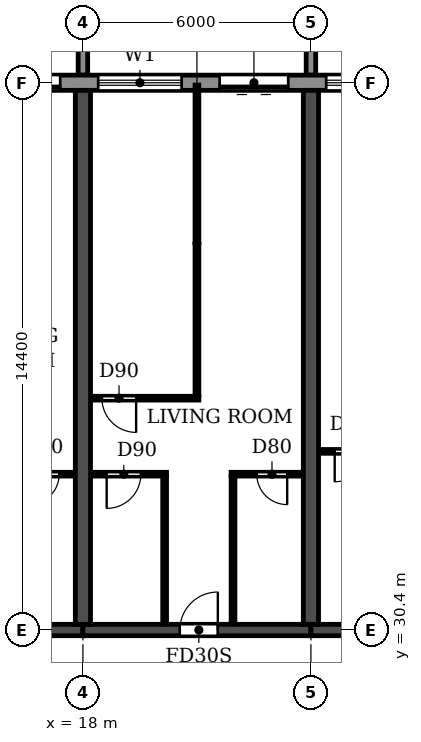
"""IFC4 building model, lengths in metres.
Left out: names, types, materials, properties, quantities, classifications, styles, units other than length and angle.
Written with IfcOpenShell. Run it as: python <this file> out.ifc"""

import sys

from ifc_helpers import new_model, si_unit, direction, frame, frame_2d, origin, place, context, subcontext, project, spatial, polyline, rectangle, outline, extrude, source, transform, mapped, element, fill, save


model = new_model("IFC4")
c1 = context("Model", 3, precision=1e-05, world=origin(), true_north=direction((0.0, 1.0)))
c2 = subcontext(c1, "Body", "Model", "MODEL_VIEW")
j1 = project(units=[si_unit("LENGTHUNIT", "METRE"), si_unit("PLANEANGLEUNIT", "RADIAN")], contexts=[c1])
p1 = place(None, origin())
s1 = spatial("IfcSite", under=j1, at=p1, CompositionType="ELEMENT")
p2 = place(p1, origin())
s2 = spatial("IfcBuilding", under=s1, at=p2, CompositionType="ELEMENT")
p3 = place(p2, frame((0.0, 0.0, 63.0)))
s3 = spatial("IfcBuildingStorey", under=s2, at=p3, CompositionType="ELEMENT", Elevation=63.0)
for number, where, z_axis, x_axis in (
    (1, (18.0, 30.55, 0.0), (0.0, 0.0, 1.0), (0.0, 1.0, 0.0)),
    (2, (24.0, 30.55, 0.0), (0.0, 0.0, 1.0), (0.0, 1.0, 0.0)),
):
    element("IfcWall", number, at=place(p3, frame(where, z_axis=z_axis, x_axis=x_axis)), inside=s3, PredefinedType="SHEAR", context=c2, shape_type="SweptSolid", body=[
        extrude(rectangle(XDim=14.05, YDim=0.4, at=frame_2d((7.025, 0.0))), origin(), (0.0, 0.0, 1.0), 2.95),
    ])
p4 = place(p3, frame((12.0, 30.4, 0.0), z_axis=(0.0, 0.0, 1.0), x_axis=(1.0, 0.0, 0.0)))
e3 = element("IfcWall", 3, at=p4, inside=s3, PredefinedType="SHEAR", context=c2, shape_type="SweptSolid", body=[
    extrude(rectangle(XDim=6.0, YDim=0.3, at=frame_2d((3.0, 0.0))), origin(), (0.0, 0.0, 1.0), 2.35),
])
p5 = place(p4, frame((2.55, 0.0, 0.0)))
e4 = element("IfcOpeningElement", 4, at=p5, cuts=e3, PredefinedType="OPENING", context=c2, shape_type="SweptSolid", body=[
    extrude(rectangle(XDim=1.0, YDim=2.1, at=frame_2d((0.5, 1.05))), frame((0.0, 0.16, 0.0), z_axis=(0.0, -1.0, 0.0), x_axis=(1.0, 0.0, 0.0)), (0.0, 0.0, 1.0), 0.32),
])
p6 = place(p3, frame((18.0, 30.4, 0.0), z_axis=(0.0, 0.0, 1.0), x_axis=(1.0, 0.0, 0.0)))
e5 = element("IfcWall", 5, at=p6, inside=s3, PredefinedType="SHEAR", context=c2, shape_type="SweptSolid", body=[
    extrude(rectangle(XDim=6.0, YDim=0.3, at=frame_2d((3.0, 0.0))), origin(), (0.0, 0.0, 1.0), 2.35),
])
p7 = place(p6, frame((2.55, 0.0, 0.0)))
e6 = element("IfcOpeningElement", 6, at=p7, cuts=e5, PredefinedType="OPENING", context=c2, shape_type="SweptSolid", body=[
    extrude(rectangle(XDim=1.0, YDim=2.1, at=frame_2d((0.5, 1.05))), frame((0.0, 0.16, 0.0), z_axis=(0.0, -1.0, 0.0), x_axis=(1.0, 0.0, 0.0)), (0.0, 0.0, 1.0), 0.32),
])
p8 = place(p3, frame((24.0, 30.4, 0.0), z_axis=(0.0, 0.0, 1.0), x_axis=(1.0, 0.0, 0.0)))
e7 = element("IfcWall", 7, at=p8, inside=s3, PredefinedType="SHEAR", context=c2, shape_type="SweptSolid", body=[
    extrude(rectangle(XDim=6.0, YDim=0.3, at=frame_2d((3.0, 0.0))), origin(), (0.0, 0.0, 1.0), 2.35),
])
p9 = place(p8, frame((2.45, 0.0, 0.0)))
e8 = element("IfcOpeningElement", 8, at=p9, cuts=e7, PredefinedType="OPENING", context=c2, shape_type="SweptSolid", body=[
    extrude(rectangle(XDim=1.0, YDim=2.1, at=frame_2d((0.5, 1.05))), frame((0.0, 0.16, 0.0), z_axis=(0.0, -1.0, 0.0), x_axis=(1.0, 0.0, 0.0)), (0.0, 0.0, 1.0), 0.32),
])
p10 = place(p3, frame((91.317, 44.8, 0.0), z_axis=(0.0, 0.0, 1.0), x_axis=(-1.0, 0.0, 0.0)))
e9 = element("IfcWall", 9, at=p10, inside=s3, PredefinedType="STANDARD", context=c2, shape_type="SweptSolid", body=[
    extrude(rectangle(XDim=80.634, YDim=0.4, at=frame_2d((40.317, 0.0))), origin(), (0.0, 0.0, 1.0), 2.95),
])
p11 = place(p10, frame((76.717, 0.0, 0.9)))
e10 = element("IfcOpeningElement", 10, at=p11, cuts=e9, PredefinedType="OPENING", context=c2, shape_type="SweptSolid", body=[
    extrude(rectangle(XDim=2.2, YDim=1.5, at=frame_2d((1.1, 0.75))), frame((0.0, 0.21, 0.0), z_axis=(0.0, -1.0, 0.0), x_axis=(1.0, 0.0, 0.0)), (0.0, 0.0, 1.0), 0.42),
])
p12 = place(p10, frame((73.917, 0.0, 0.0)))
e11 = element("IfcOpeningElement", 11, at=p12, cuts=e9, PredefinedType="OPENING", context=c2, shape_type="SweptSolid", body=[
    extrude(rectangle(XDim=1.8, YDim=2.4, at=frame_2d((0.9, 1.2))), frame((0.0, 0.21, 0.0), z_axis=(0.0, -1.0, 0.0), x_axis=(1.0, 0.0, 0.0)), (0.0, 0.0, 1.0), 0.42),
])
p13 = place(p10, frame((70.717, 0.0, 0.9)))
e12 = element("IfcOpeningElement", 12, at=p13, cuts=e9, PredefinedType="OPENING", context=c2, shape_type="SweptSolid", body=[
    extrude(rectangle(XDim=2.2, YDim=1.5, at=frame_2d((1.1, 0.75))), frame((0.0, 0.21, 0.0), z_axis=(0.0, -1.0, 0.0), x_axis=(1.0, 0.0, 0.0)), (0.0, 0.0, 1.0), 0.42),
])
p14 = place(p10, frame((67.917, 0.0, 0.0)))
e13 = element("IfcOpeningElement", 13, at=p14, cuts=e9, PredefinedType="OPENING", context=c2, shape_type="SweptSolid", body=[
    extrude(rectangle(XDim=1.8, YDim=2.4, at=frame_2d((0.9, 1.2))), frame((0.0, 0.21, 0.0), z_axis=(0.0, -1.0, 0.0), x_axis=(1.0, 0.0, 0.0)), (0.0, 0.0, 1.0), 0.42),
])
p15 = place(p10, frame((64.717, 0.0, 0.9)))
e14 = element("IfcOpeningElement", 14, at=p15, cuts=e9, PredefinedType="OPENING", context=c2, shape_type="SweptSolid", body=[
    extrude(rectangle(XDim=2.2, YDim=1.5, at=frame_2d((1.1, 0.75))), frame((0.0, 0.21, 0.0), z_axis=(0.0, -1.0, 0.0), x_axis=(1.0, 0.0, 0.0)), (0.0, 0.0, 1.0), 0.42),
])
p16 = place(p10, frame((61.917, 0.0, 0.0)))
e15 = element("IfcOpeningElement", 15, at=p16, cuts=e9, PredefinedType="OPENING", context=c2, shape_type="SweptSolid", body=[
    extrude(rectangle(XDim=1.8, YDim=2.4, at=frame_2d((0.9, 1.2))), frame((0.0, 0.21, 0.0), z_axis=(0.0, -1.0, 0.0), x_axis=(1.0, 0.0, 0.0)), (0.0, 0.0, 1.0), 0.42),
])
p17 = place(p10, frame((58.717, 0.0, 0.9)))
e16 = element("IfcOpeningElement", 16, at=p17, cuts=e9, PredefinedType="OPENING", context=c2, shape_type="SweptSolid", body=[
    extrude(rectangle(XDim=2.2, YDim=1.5, at=frame_2d((1.1, 0.75))), frame((0.0, 0.21, 0.0), z_axis=(0.0, -1.0, 0.0), x_axis=(1.0, 0.0, 0.0)), (0.0, 0.0, 1.0), 0.42),
])
p18 = place(p10, frame((55.717, 0.0, 0.9)))
e17 = element("IfcOpeningElement", 17, at=p18, cuts=e9, PredefinedType="OPENING", context=c2, shape_type="SweptSolid", body=[
    extrude(rectangle(XDim=2.2, YDim=1.5, at=frame_2d((1.1, 0.75))), frame((0.0, 0.21, 0.0), z_axis=(0.0, -1.0, 0.0), x_axis=(1.0, 0.0, 0.0)), (0.0, 0.0, 1.0), 0.42),
])
p19 = place(p10, frame((52.917, 0.0, 0.0)))
e18 = element("IfcOpeningElement", 18, at=p19, cuts=e9, PredefinedType="OPENING", context=c2, shape_type="SweptSolid", body=[
    extrude(rectangle(XDim=1.8, YDim=2.4, at=frame_2d((0.9, 1.2))), frame((0.0, 0.21, 0.0), z_axis=(0.0, -1.0, 0.0), x_axis=(1.0, 0.0, 0.0)), (0.0, 0.0, 1.0), 0.42),
])
p20 = place(p10, frame((49.717, 0.0, 0.9)))
e19 = element("IfcOpeningElement", 19, at=p20, cuts=e9, PredefinedType="OPENING", context=c2, shape_type="SweptSolid", body=[
    extrude(rectangle(XDim=2.2, YDim=1.5, at=frame_2d((1.1, 0.75))), frame((0.0, 0.21, 0.0), z_axis=(0.0, -1.0, 0.0), x_axis=(1.0, 0.0, 0.0)), (0.0, 0.0, 1.0), 0.42),
])
p21 = place(p10, frame((46.917, 0.0, 0.0)))
e20 = element("IfcOpeningElement", 20, at=p21, cuts=e9, PredefinedType="OPENING", context=c2, shape_type="SweptSolid", body=[
    extrude(rectangle(XDim=1.8, YDim=2.4, at=frame_2d((0.9, 1.2))), frame((0.0, 0.21, 0.0), z_axis=(0.0, -1.0, 0.0), x_axis=(1.0, 0.0, 0.0)), (0.0, 0.0, 1.0), 0.42),
])
p22 = place(p10, frame((43.717, 0.0, 0.9)))
e21 = element("IfcOpeningElement", 21, at=p22, cuts=e9, PredefinedType="OPENING", context=c2, shape_type="SweptSolid", body=[
    extrude(rectangle(XDim=2.2, YDim=1.5, at=frame_2d((1.1, 0.75))), frame((0.0, 0.21, 0.0), z_axis=(0.0, -1.0, 0.0), x_axis=(1.0, 0.0, 0.0)), (0.0, 0.0, 1.0), 0.42),
])
p23 = place(p10, frame((40.717, 0.0, 0.9)))
e22 = element("IfcOpeningElement", 22, at=p23, cuts=e9, PredefinedType="OPENING", context=c2, shape_type="SweptSolid", body=[
    extrude(rectangle(XDim=2.2, YDim=1.5, at=frame_2d((1.1, 0.75))), frame((0.0, 0.21, 0.0), z_axis=(0.0, -1.0, 0.0), x_axis=(1.0, 0.0, 0.0)), (0.0, 0.0, 1.0), 0.42),
])
p24 = place(p10, frame((37.717, 0.0, 0.9)))
e23 = element("IfcOpeningElement", 23, at=p24, cuts=e9, PredefinedType="OPENING", context=c2, shape_type="SweptSolid", body=[
    extrude(rectangle(XDim=2.2, YDim=1.5, at=frame_2d((1.1, 0.75))), frame((0.0, 0.21, 0.0), z_axis=(0.0, -1.0, 0.0), x_axis=(1.0, 0.0, 0.0)), (0.0, 0.0, 1.0), 0.42),
])
p25 = place(p10, frame((34.717, 0.0, 0.9)))
e24 = element("IfcOpeningElement", 24, at=p25, cuts=e9, PredefinedType="OPENING", context=c2, shape_type="SweptSolid", body=[
    extrude(rectangle(XDim=2.2, YDim=1.5, at=frame_2d((1.1, 0.75))), frame((0.0, 0.21, 0.0), z_axis=(0.0, -1.0, 0.0), x_axis=(1.0, 0.0, 0.0)), (0.0, 0.0, 1.0), 0.42),
])
p26 = place(p10, frame((31.917, 0.0, 0.0)))
e25 = element("IfcOpeningElement", 25, at=p26, cuts=e9, PredefinedType="OPENING", context=c2, shape_type="SweptSolid", body=[
    extrude(rectangle(XDim=1.8, YDim=2.4, at=frame_2d((0.9, 1.2))), frame((0.0, 0.21, 0.0), z_axis=(0.0, -1.0, 0.0), x_axis=(1.0, 0.0, 0.0)), (0.0, 0.0, 1.0), 0.42),
])
p27 = place(p10, frame((28.917, 0.0, 0.0)))
e26 = element("IfcOpeningElement", 26, at=p27, cuts=e9, PredefinedType="OPENING", context=c2, shape_type="SweptSolid", body=[
    extrude(rectangle(XDim=1.8, YDim=2.4, at=frame_2d((0.9, 1.2))), frame((0.0, 0.21, 0.0), z_axis=(0.0, -1.0, 0.0), x_axis=(1.0, 0.0, 0.0)), (0.0, 0.0, 1.0), 0.42),
])
p28 = place(p10, frame((25.717, 0.0, 0.9)))
e27 = element("IfcOpeningElement", 27, at=p28, cuts=e9, PredefinedType="OPENING", context=c2, shape_type="SweptSolid", body=[
    extrude(rectangle(XDim=2.2, YDim=1.5, at=frame_2d((1.1, 0.75))), frame((0.0, 0.21, 0.0), z_axis=(0.0, -1.0, 0.0), x_axis=(1.0, 0.0, 0.0)), (0.0, 0.0, 1.0), 0.42),
])
p29 = place(p10, frame((22.917, 0.0, 0.0)))
e28 = element("IfcOpeningElement", 28, at=p29, cuts=e9, PredefinedType="OPENING", context=c2, shape_type="SweptSolid", body=[
    extrude(rectangle(XDim=1.8, YDim=2.4, at=frame_2d((0.9, 1.2))), frame((0.0, 0.21, 0.0), z_axis=(0.0, -1.0, 0.0), x_axis=(1.0, 0.0, 0.0)), (0.0, 0.0, 1.0), 0.42),
])
p30 = place(p10, frame((19.717, 0.0, 0.9)))
e29 = element("IfcOpeningElement", 29, at=p30, cuts=e9, PredefinedType="OPENING", context=c2, shape_type="SweptSolid", body=[
    extrude(rectangle(XDim=2.2, YDim=1.5, at=frame_2d((1.1, 0.75))), frame((0.0, 0.21, 0.0), z_axis=(0.0, -1.0, 0.0), x_axis=(1.0, 0.0, 0.0)), (0.0, 0.0, 1.0), 0.42),
])
p31 = place(p10, frame((16.917, 0.0, 0.0)))
e30 = element("IfcOpeningElement", 30, at=p31, cuts=e9, PredefinedType="OPENING", context=c2, shape_type="SweptSolid", body=[
    extrude(rectangle(XDim=1.8, YDim=2.4, at=frame_2d((0.9, 1.2))), frame((0.0, 0.21, 0.0), z_axis=(0.0, -1.0, 0.0), x_axis=(1.0, 0.0, 0.0)), (0.0, 0.0, 1.0), 0.42),
])
p32 = place(p10, frame((13.717, 0.0, 0.9)))
e31 = element("IfcOpeningElement", 31, at=p32, cuts=e9, PredefinedType="OPENING", context=c2, shape_type="SweptSolid", body=[
    extrude(rectangle(XDim=2.2, YDim=1.5, at=frame_2d((1.1, 0.75))), frame((0.0, 0.21, 0.0), z_axis=(0.0, -1.0, 0.0), x_axis=(1.0, 0.0, 0.0)), (0.0, 0.0, 1.0), 0.42),
])
p33 = place(p10, frame((10.917, 0.0, 0.0)))
e32 = element("IfcOpeningElement", 32, at=p33, cuts=e9, PredefinedType="OPENING", context=c2, shape_type="SweptSolid", body=[
    extrude(rectangle(XDim=1.8, YDim=2.4, at=frame_2d((0.9, 1.2))), frame((0.0, 0.21, 0.0), z_axis=(0.0, -1.0, 0.0), x_axis=(1.0, 0.0, 0.0)), (0.0, 0.0, 1.0), 0.42),
])
p34 = place(p10, frame((7.717, 0.0, 0.9)))
e33 = element("IfcOpeningElement", 33, at=p34, cuts=e9, PredefinedType="OPENING", context=c2, shape_type="SweptSolid", body=[
    extrude(rectangle(XDim=2.2, YDim=1.5, at=frame_2d((1.1, 0.75))), frame((0.0, 0.21, 0.0), z_axis=(0.0, -1.0, 0.0), x_axis=(1.0, 0.0, 0.0)), (0.0, 0.0, 1.0), 0.42),
])
p35 = place(p10, frame((4.717, 0.0, 0.9)))
e34 = element("IfcOpeningElement", 34, at=p35, cuts=e9, PredefinedType="OPENING", context=c2, shape_type="SweptSolid", body=[
    extrude(rectangle(XDim=2.2, YDim=1.5, at=frame_2d((1.1, 0.75))), frame((0.0, 0.21, 0.0), z_axis=(0.0, -1.0, 0.0), x_axis=(1.0, 0.0, 0.0)), (0.0, 0.0, 1.0), 0.42),
])
p36 = place(p10, frame((1.717, 0.0, 0.9)))
e35 = element("IfcOpeningElement", 35, at=p36, cuts=e9, PredefinedType="OPENING", context=c2, shape_type="SweptSolid", body=[
    extrude(rectangle(XDim=2.2, YDim=1.5, at=frame_2d((1.1, 0.75))), frame((0.0, 0.21, 0.0), z_axis=(0.0, -1.0, 0.0), x_axis=(1.0, 0.0, 0.0)), (0.0, 0.0, 1.0), 0.42),
])
m1 = source(origin(), c2, "Body", "SweptSolid", [
    extrude(outline(polyline([(0.0, 0.0), (0.25, 0.0), (0.25, 3.1), (0.0, 3.1), (0.0, 0.0)])), origin(), (0.0, 0.0, 1.0), 3.1),
])
for number, where in (
    (36, (17.875, 45.0, 0.0)),
    (37, (23.875, 45.0, 0.0)),
):
    element("IfcWall", number, at=place(p3, frame(where)), inside=s3, PredefinedType="STANDARD", context=c2, shape_type="MappedRepresentation", body=[
        mapped(m1, transform((0.0, 0.0, 0.0))),
    ])
p37 = place(p3, frame((15.9, 34.5, 0.0), z_axis=(0.0, 0.0, 1.0), x_axis=(1.0, 0.0, 0.0)))
e38 = element("IfcWall", 38, at=p37, inside=s3, PredefinedType="PARTITIONING", context=c2, shape_type="SweptSolid", body=[
    extrude(rectangle(XDim=1.89, YDim=0.1, at=frame_2d((0.945, 0.0))), origin(), (0.0, 0.0, 1.0), 2.95),
])
p38 = place(p37, frame((0.675, 0.0, 0.0)))
e39 = element("IfcOpeningElement", 39, at=p38, cuts=e38, PredefinedType="OPENING", context=c2, shape_type="SweptSolid", body=[
    extrude(rectangle(XDim=0.8, YDim=2.1, at=frame_2d((0.4, 1.05))), frame((0.0, 0.06, 0.0), z_axis=(0.0, -1.0, 0.0), x_axis=(1.0, 0.0, 0.0)), (0.0, 0.0, 1.0), 0.12),
])
p39 = place(p3, frame((18.21, 34.5, 0.0), z_axis=(0.0, 0.0, 1.0), x_axis=(1.0, 0.0, 0.0)))
e40 = element("IfcWall", 40, at=p39, inside=s3, PredefinedType="PARTITIONING", context=c2, shape_type="SweptSolid", body=[
    extrude(rectangle(XDim=1.99, YDim=0.1, at=frame_2d((0.995, 0.0))), origin(), (0.0, 0.0, 1.0), 2.95),
])
p40 = place(p39, frame((0.415, 0.0, 0.0)))
e41 = element("IfcOpeningElement", 41, at=p40, cuts=e40, PredefinedType="OPENING", context=c2, shape_type="SweptSolid", body=[
    extrude(rectangle(XDim=0.9, YDim=2.1, at=frame_2d((0.45, 1.05))), frame((0.0, 0.06, 0.0), z_axis=(0.0, -1.0, 0.0), x_axis=(1.0, 0.0, 0.0)), (0.0, 0.0, 1.0), 0.12),
])
p41 = place(p3, frame((21.9, 34.5, 0.0), z_axis=(0.0, 0.0, 1.0), x_axis=(1.0, 0.0, 0.0)))
e42 = element("IfcWall", 42, at=p41, inside=s3, PredefinedType="PARTITIONING", context=c2, shape_type="SweptSolid", body=[
    extrude(rectangle(XDim=1.89, YDim=0.1, at=frame_2d((0.945, 0.0))), origin(), (0.0, 0.0, 1.0), 2.95),
])
p42 = place(p41, frame((0.675, 0.0, 0.0)))
e43 = element("IfcOpeningElement", 43, at=p42, cuts=e42, PredefinedType="OPENING", context=c2, shape_type="SweptSolid", body=[
    extrude(rectangle(XDim=0.8, YDim=2.1, at=frame_2d((0.4, 1.05))), frame((0.0, 0.06, 0.0), z_axis=(0.0, -1.0, 0.0), x_axis=(1.0, 0.0, 0.0)), (0.0, 0.0, 1.0), 0.12),
])
p43 = place(p3, frame((24.21, 35.1, 0.0), z_axis=(0.0, 0.0, 1.0), x_axis=(1.0, 0.0, 0.0)))
e44 = element("IfcWall", 44, at=p43, inside=s3, PredefinedType="PARTITIONING", context=c2, shape_type="SweptSolid", body=[
    extrude(rectangle(XDim=1.89, YDim=0.1, at=frame_2d((0.945, 0.0))), origin(), (0.0, 0.0, 1.0), 2.95),
])
p44 = place(p43, frame((0.415, 0.0, 0.0)))
e45 = element("IfcOpeningElement", 45, at=p44, cuts=e44, PredefinedType="OPENING", context=c2, shape_type="SweptSolid", body=[
    extrude(rectangle(XDim=0.8, YDim=2.1, at=frame_2d((0.4, 1.05))), frame((0.0, 0.06, 0.0), z_axis=(0.0, -1.0, 0.0), x_axis=(1.0, 0.0, 0.0)), (0.0, 0.0, 1.0), 0.12),
])
p45 = place(p3, frame((18.21, 36.5, 0.0), z_axis=(0.0, 0.0, 1.0), x_axis=(1.0, 0.0, 0.0)))
e46 = element("IfcWall", 46, at=p45, inside=s3, PredefinedType="PARTITIONING", context=c2, shape_type="SweptSolid", body=[
    extrude(rectangle(XDim=2.84, YDim=0.1, at=frame_2d((1.42, 0.0))), origin(), (0.0, 0.0, 1.0), 2.95),
])
p46 = place(p45, frame((0.29, 0.0, 0.0)))
e47 = element("IfcOpeningElement", 47, at=p46, cuts=e46, PredefinedType="OPENING", context=c2, shape_type="SweptSolid", body=[
    extrude(rectangle(XDim=0.9, YDim=2.1, at=frame_2d((0.45, 1.05))), frame((0.0, 0.06, 0.0), z_axis=(0.0, -1.0, 0.0), x_axis=(1.0, 0.0, 0.0)), (0.0, 0.0, 1.0), 0.12),
])
p47 = place(p3, frame((20.15, 30.56, 0.0), z_axis=(0.0, 0.0, 1.0), x_axis=(0.0, 1.0, 0.0)))
e48 = element("IfcWall", 48, at=p47, inside=s3, PredefinedType="PARTITIONING", context=c2, shape_type="SweptSolid", body=[
    extrude(rectangle(XDim=3.89, YDim=0.1, at=frame_2d((1.945, 0.0))), origin(), (0.0, 0.0, 1.0), 2.95),
])
p48 = place(p3, frame((21.0, 36.55, 0.0), z_axis=(0.0, 0.0, 1.0), x_axis=(0.0, 1.0, 0.0)))
e49 = element("IfcWall", 49, at=p48, inside=s3, PredefinedType="PARTITIONING", context=c2, shape_type="SweptSolid", body=[
    extrude(rectangle(XDim=8.19, YDim=0.1, at=frame_2d((4.095, 0.0))), origin(), (0.0, 0.0, 1.0), 2.95),
])
p49 = place(p3, frame((21.95, 30.56, 0.0), z_axis=(0.0, 0.0, 1.0), x_axis=(0.0, 1.0, 0.0)))
e50 = element("IfcWall", 50, at=p49, inside=s3, PredefinedType="PARTITIONING", context=c2, shape_type="SweptSolid", body=[
    extrude(rectangle(XDim=3.89, YDim=0.1, at=frame_2d((1.945, 0.0))), origin(), (0.0, 0.0, 1.0), 2.95),
])
p50 = place(p12, origin())
e51 = element("IfcDoor", 51, at=p50, inside=s3, OperationType="DOUBLE_DOOR_SLIDING", PredefinedType="DOOR", context=c2, shape_type="SweptSolid", body=[
    extrude(rectangle(XDim=1.8, YDim=2.4, at=frame_2d((0.9, 1.2))), frame((0.0, 0.025, 0.0), z_axis=(0.0, -1.0, 0.0), x_axis=(1.0, 0.0, 0.0)), (0.0, 0.0, 1.0), 0.05),
])
fill(e11, e51)
p51 = place(p13, origin())
e52 = element("IfcWindow", 52, at=p51, inside=s3, PartitioningType="DOUBLE_PANEL_HORIZONTAL", PredefinedType="WINDOW", context=c2, shape_type="SweptSolid", body=[
    extrude(rectangle(XDim=2.2, YDim=1.5, at=frame_2d((1.1, 0.75))), frame((0.0, 0.03, 0.0), z_axis=(0.0, -1.0, 0.0), x_axis=(1.0, 0.0, 0.0)), (0.0, 0.0, 1.0), 0.06),
])
fill(e12, e52)
p52 = place(p14, origin())
e53 = element("IfcDoor", 53, at=p52, inside=s3, OperationType="DOUBLE_DOOR_SLIDING", PredefinedType="DOOR", context=c2, shape_type="SweptSolid", body=[
    extrude(rectangle(XDim=1.8, YDim=2.4, at=frame_2d((0.9, 1.2))), frame((0.0, 0.025, 0.0), z_axis=(0.0, -1.0, 0.0), x_axis=(1.0, 0.0, 0.0)), (0.0, 0.0, 1.0), 0.05),
])
fill(e13, e53)
p53 = place(p15, origin())
e54 = element("IfcWindow", 54, at=p53, inside=s3, PartitioningType="DOUBLE_PANEL_HORIZONTAL", PredefinedType="WINDOW", context=c2, shape_type="SweptSolid", body=[
    extrude(rectangle(XDim=2.2, YDim=1.5, at=frame_2d((1.1, 0.75))), frame((0.0, 0.03, 0.0), z_axis=(0.0, -1.0, 0.0), x_axis=(1.0, 0.0, 0.0)), (0.0, 0.0, 1.0), 0.06),
])
fill(e14, e54)
p54 = place(p38, frame((0.8, 0.0, 0.0), z_axis=(0.0, 0.0, 1.0), x_axis=(-1.0, 0.0, 0.0)))
e55 = element("IfcDoor", 55, at=p54, inside=s3, OperationType="SINGLE_SWING_RIGHT", PredefinedType="DOOR", context=c2, shape_type="SweptSolid", body=[
    extrude(rectangle(XDim=0.8, YDim=2.1, at=frame_2d((0.4, 1.05))), frame((0.0, 0.025, 0.0), z_axis=(0.0, -1.0, 0.0), x_axis=(1.0, 0.0, 0.0)), (0.0, 0.0, 1.0), 0.05),
])
fill(e39, e55)
p55 = place(p46, frame((0.9, 0.0, 0.0), z_axis=(0.0, 0.0, 1.0), x_axis=(-1.0, 0.0, 0.0)))
e56 = element("IfcDoor", 56, at=p55, inside=s3, OperationType="SINGLE_SWING_LEFT", PredefinedType="DOOR", context=c2, shape_type="SweptSolid", body=[
    extrude(rectangle(XDim=0.9, YDim=2.1, at=frame_2d((0.45, 1.05))), frame((0.0, 0.025, 0.0), z_axis=(0.0, -1.0, 0.0), x_axis=(1.0, 0.0, 0.0)), (0.0, 0.0, 1.0), 0.05),
])
fill(e47, e56)
p56 = place(p40, frame((0.9, 0.0, 0.0), z_axis=(0.0, 0.0, 1.0), x_axis=(-1.0, 0.0, 0.0)))
e57 = element("IfcDoor", 57, at=p56, inside=s3, OperationType="SINGLE_SWING_RIGHT", PredefinedType="DOOR", context=c2, shape_type="SweptSolid", body=[
    extrude(rectangle(XDim=0.9, YDim=2.1, at=frame_2d((0.45, 1.05))), frame((0.0, 0.025, 0.0), z_axis=(0.0, -1.0, 0.0), x_axis=(1.0, 0.0, 0.0)), (0.0, 0.0, 1.0), 0.05),
])
fill(e41, e57)
p57 = place(p7, origin())
e58 = element("IfcDoor", 58, at=p57, inside=s3, OperationType="SINGLE_SWING_RIGHT", PredefinedType="DOOR", context=c2, shape_type="SweptSolid", body=[
    extrude(rectangle(XDim=1.0, YDim=2.1, at=frame_2d((0.5, 1.05))), frame((0.0, 0.025, 0.0), z_axis=(0.0, -1.0, 0.0), x_axis=(1.0, 0.0, 0.0)), (0.0, 0.0, 1.0), 0.05),
])
fill(e6, e58)
p58 = place(p42, frame((0.8, 0.0, 0.0), z_axis=(0.0, 0.0, 1.0), x_axis=(-1.0, 0.0, 0.0)))
e59 = element("IfcDoor", 59, at=p58, inside=s3, OperationType="SINGLE_SWING_LEFT", PredefinedType="DOOR", context=c2, shape_type="SweptSolid", body=[
    extrude(rectangle(XDim=0.8, YDim=2.1, at=frame_2d((0.4, 1.05))), frame((0.0, 0.025, 0.0), z_axis=(0.0, -1.0, 0.0), x_axis=(1.0, 0.0, 0.0)), (0.0, 0.0, 1.0), 0.05),
])
fill(e43, e59)
p59 = place(p44, frame((0.8, 0.0, 0.0), z_axis=(0.0, 0.0, 1.0), x_axis=(-1.0, 0.0, 0.0)))
e60 = element("IfcDoor", 60, at=p59, inside=s3, OperationType="SINGLE_SWING_RIGHT", PredefinedType="DOOR", context=c2, shape_type="SweptSolid", body=[
    extrude(rectangle(XDim=0.8, YDim=2.1, at=frame_2d((0.4, 1.05))), frame((0.0, 0.025, 0.0), z_axis=(0.0, -1.0, 0.0), x_axis=(1.0, 0.0, 0.0)), (0.0, 0.0, 1.0), 0.05),
])
fill(e45, e60)
save(model, sys.argv[1])
